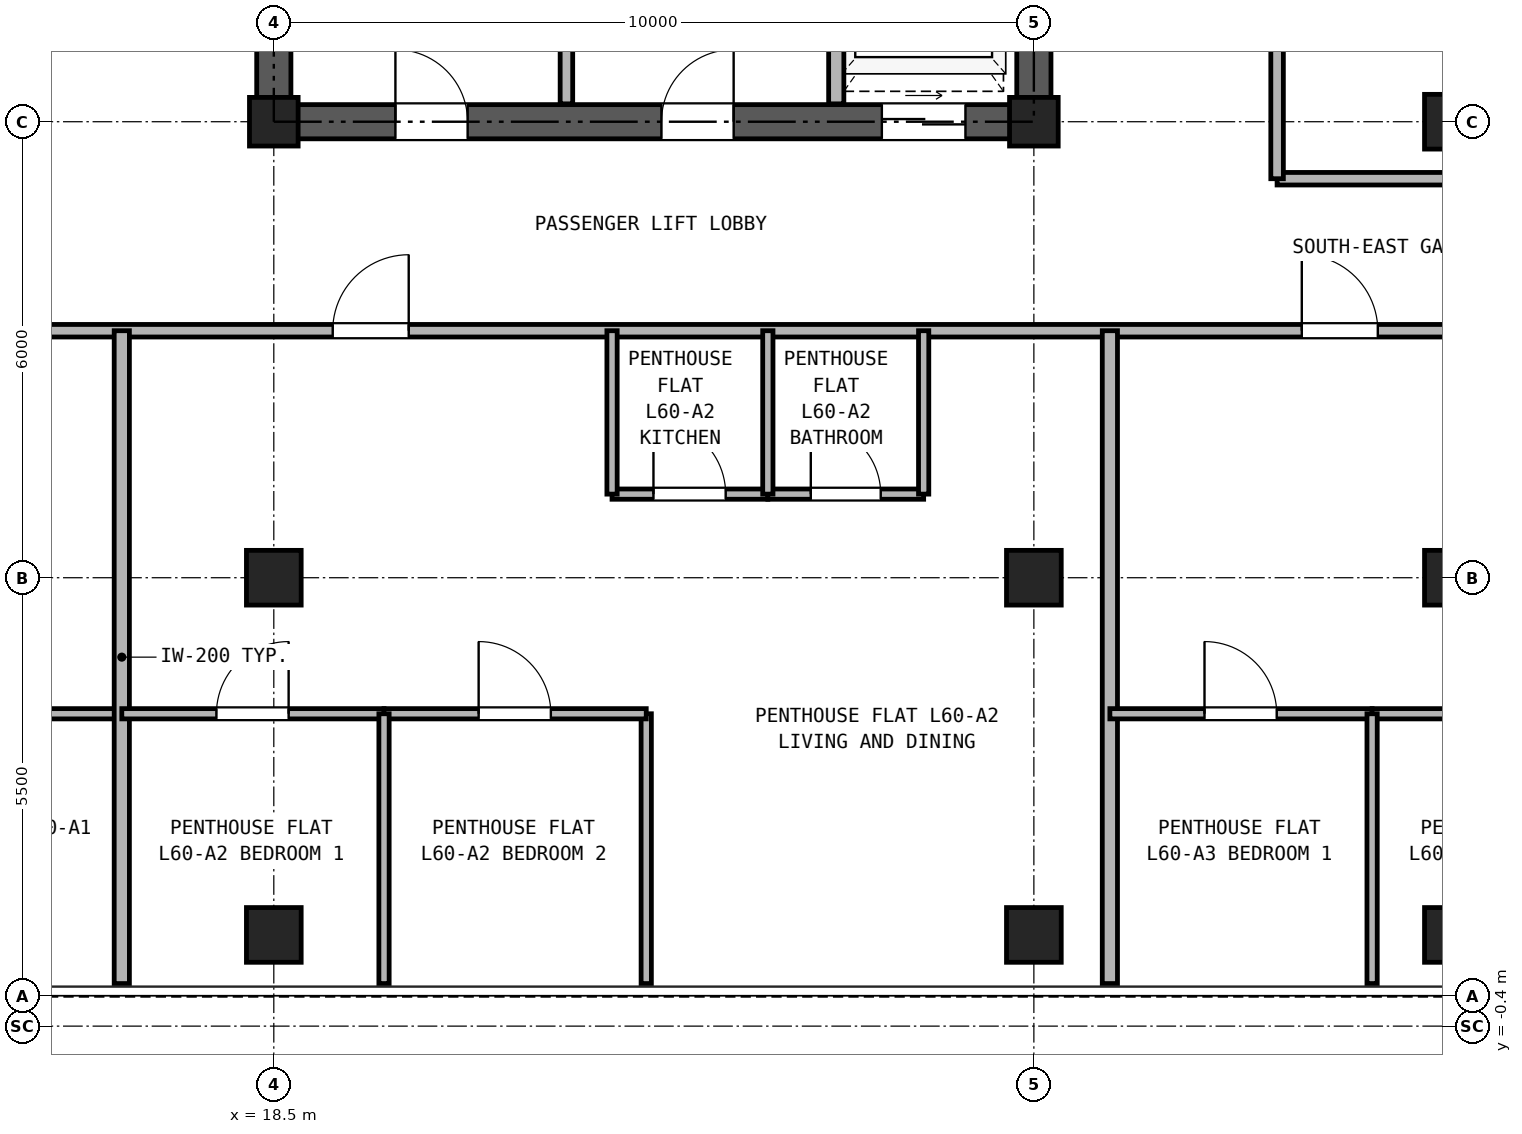
"""IFC4 building model, lengths in metres.
Left out: names, types, materials, properties, quantities, classifications, styles, units other than length and angle.
Written with IfcOpenShell. Run it as: python <this file> out.ifc"""

import sys

from ifc_helpers import new_model, si_unit, direction, frame, frame_2d, origin, origin_2d, place, context, subcontext, project, spatial, rectangle, hollow_rectangle, extrude, source, transform, mapped, element, fill, save


model = new_model("IFC4")
c1 = context("Model", 3, precision=1e-05, world=origin(), true_north=direction((0.0, 1.0)))
c2 = subcontext(c1, "Body", "Model", "MODEL_VIEW")
j1 = project(units=[si_unit("LENGTHUNIT", "METRE"), si_unit("PLANEANGLEUNIT", "RADIAN")], contexts=[c1])
p1 = place(None, origin())
s1 = spatial("IfcSite", under=j1, at=p1, CompositionType="ELEMENT")
p2 = place(p1, origin())
s2 = spatial("IfcBuilding", under=s1, at=p2, CompositionType="ELEMENT")
p3 = place(p2, frame((0.0, 0.0, 212.4)))
s3 = spatial("IfcBuildingStorey", under=s2, at=p3, CompositionType="ELEMENT", Elevation=212.4)
m1 = source(origin(), c2, "Body", "SweptSolid", [
    extrude(hollow_rectangle(XDim=0.72, YDim=0.72, WallThickness=0.04, at=origin_2d()), origin(), (0.0, 0.0, 1.0), 2.84),
])
for number, where, z_axis, x_axis in (
    (1, (18.5, 0.8, 0.0), (0.0, 0.0, 1.0), (1.0, 0.0, 0.0)),
    (2, (28.5, 0.8, 0.0), (0.0, 0.0, 1.0), (1.0, 0.0, 0.0)),
    (3, (34.0, 0.8, 0.0), (0.0, 0.0, 1.0), (1.0, 0.0, 0.0)),
    (4, (18.5, 5.5, 0.0), (0.0, 0.0, 1.0), (1.0, 0.0, 0.0)),
):
    element("IfcColumn", number, at=place(p3, frame(where, z_axis=z_axis, x_axis=x_axis)), inside=s3, PredefinedType="COLUMN", context=c2, shape_type="MappedRepresentation", body=[
        mapped(m1, transform((0.0, 0.0, 0.0), x_axis=(1.0, 0.0, 0.0), y_axis=(0.0, 1.0, 0.0), z_axis=(0.0, 0.0, 1.0), scale=1.0)),
    ])
m2 = source(origin(), c2, "Body", "SweptSolid", [
    extrude(hollow_rectangle(XDim=0.64, YDim=0.64, WallThickness=0.035, at=origin_2d()), origin(), (0.0, 0.0, 1.0), 2.84),
])
p4 = place(p3, frame((18.5, 11.5, 0.0), z_axis=(0.0, 0.0, 1.0), x_axis=(1.0, 0.0, 0.0)))
e5 = element("IfcColumn", 5, at=p4, inside=s3, PredefinedType="COLUMN", context=c2, shape_type="MappedRepresentation", body=[
    mapped(m2, transform((0.0, 0.0, 0.0), x_axis=(1.0, 0.0, 0.0), y_axis=(0.0, 1.0, 0.0), z_axis=(0.0, 0.0, 1.0), scale=1.0)),
])
p5 = place(p3, frame((28.5, 5.5, 0.0), z_axis=(0.0, 0.0, 1.0), x_axis=(1.0, 0.0, 0.0)))
e6 = element("IfcColumn", 6, at=p5, inside=s3, PredefinedType="COLUMN", context=c2, shape_type="MappedRepresentation", body=[
    mapped(m1, transform((0.0, 0.0, 0.0), x_axis=(1.0, 0.0, 0.0), y_axis=(0.0, 1.0, 0.0), z_axis=(0.0, 0.0, 1.0), scale=1.0)),
])
p6 = place(p3, frame((28.5, 11.5, 0.0), z_axis=(0.0, 0.0, 1.0), x_axis=(1.0, 0.0, 0.0)))
e7 = element("IfcColumn", 7, at=p6, inside=s3, PredefinedType="COLUMN", context=c2, shape_type="MappedRepresentation", body=[
    mapped(m2, transform((0.0, 0.0, 0.0), x_axis=(1.0, 0.0, 0.0), y_axis=(0.0, 1.0, 0.0), z_axis=(0.0, 0.0, 1.0), scale=1.0)),
])
for number, where, z_axis, x_axis in (
    (8, (34.0, 5.5, 0.0), (0.0, 0.0, 1.0), (1.0, 0.0, 0.0)),
    (9, (34.0, 11.5, 0.0), (0.0, 0.0, 1.0), (1.0, 0.0, 0.0)),
):
    element("IfcColumn", number, at=place(p3, frame(where, z_axis=z_axis, x_axis=x_axis)), inside=s3, PredefinedType="COLUMN", context=c2, shape_type="MappedRepresentation", body=[
        mapped(m1, transform((0.0, 0.0, 0.0), x_axis=(1.0, 0.0, 0.0), y_axis=(0.0, 1.0, 0.0), z_axis=(0.0, 0.0, 1.0), scale=1.0)),
    ])
p7 = place(p3, frame((18.275, 11.5, 0.0), z_axis=(0.0, 0.0, 1.0), x_axis=(1.0, 0.0, 0.0)))
e10 = element("IfcWall", 10, at=p7, inside=s3, PredefinedType="SHEAR", context=c2, shape_type="SweptSolid", body=[
    extrude(rectangle(XDim=10.45, YDim=0.45, at=frame_2d((5.225, 0.0))), origin(), (0.0, 0.0, 1.0), 2.84),
])
p8 = place(p7, frame((1.825, 0.0, 0.0)))
e11 = element("IfcOpeningElement", 11, at=p8, cuts=e10, PredefinedType="OPENING", context=c2, shape_type="SweptSolid", body=[
    extrude(rectangle(XDim=0.95, YDim=2.15, at=frame_2d((0.475, 1.075))), frame((0.0, 0.235, 0.0), z_axis=(0.0, -1.0, 0.0), x_axis=(1.0, 0.0, 0.0)), (0.0, 0.0, 1.0), 0.47),
])
p9 = place(p7, frame((5.325, 0.0, 0.0)))
e12 = element("IfcOpeningElement", 12, at=p9, cuts=e10, PredefinedType="OPENING", context=c2, shape_type="SweptSolid", body=[
    extrude(rectangle(XDim=0.95, YDim=2.15, at=frame_2d((0.475, 1.075))), frame((0.0, 0.235, 0.0), z_axis=(0.0, -1.0, 0.0), x_axis=(1.0, 0.0, 0.0)), (0.0, 0.0, 1.0), 0.47),
])
p10 = place(p7, frame((8.225, 0.0, 0.0)))
e13 = element("IfcOpeningElement", 13, at=p10, cuts=e10, PredefinedType="OPENING", context=c2, shape_type="SweptSolid", body=[
    extrude(rectangle(XDim=1.1, YDim=2.25, at=frame_2d((0.55, 1.125))), frame((0.0, 0.235, 0.0), z_axis=(0.0, -1.0, 0.0), x_axis=(1.0, 0.0, 0.0)), (0.0, 0.0, 1.0), 0.47),
])
p11 = place(p3, frame((18.5, 11.725, 0.0), z_axis=(0.0, 0.0, 1.0), x_axis=(0.0, 1.0, 0.0)))
e14 = element("IfcWall", 14, at=p11, inside=s3, PredefinedType="SHEAR", context=c2, shape_type="SweptSolid", body=[
    extrude(rectangle(XDim=16.8, YDim=0.45, at=frame_2d((8.4, 0.0))), origin(), (0.0, 0.0, 1.0), 2.84),
])
p12 = place(p11, frame((7.425, 0.0, 0.0)))
e15 = element("IfcOpeningElement", 15, at=p12, cuts=e14, PredefinedType="OPENING", context=c2, shape_type="SweptSolid", body=[
    extrude(rectangle(XDim=1.15, YDim=2.2, at=frame_2d((0.575, 1.1))), frame((0.0, 0.235, 0.0), z_axis=(0.0, -1.0, 0.0), x_axis=(1.0, 0.0, 0.0)), (0.0, 0.0, 1.0), 0.47),
])
p13 = place(p3, frame((28.5, 11.725, 0.0), z_axis=(0.0, 0.0, 1.0), x_axis=(0.0, 1.0, 0.0)))
e16 = element("IfcWall", 16, at=p13, inside=s3, PredefinedType="SHEAR", context=c2, shape_type="SweptSolid", body=[
    extrude(rectangle(XDim=16.8, YDim=0.45, at=frame_2d((8.4, 0.0))), origin(), (0.0, 0.0, 1.0), 2.84),
])
p14 = place(p13, frame((7.425, 0.0, 0.0)))
e17 = element("IfcOpeningElement", 17, at=p14, cuts=e16, PredefinedType="OPENING", context=c2, shape_type="SweptSolid", body=[
    extrude(rectangle(XDim=1.15, YDim=2.2, at=frame_2d((0.575, 1.1))), frame((0.0, 0.235, 0.0), z_axis=(0.0, -1.0, 0.0), x_axis=(1.0, 0.0, 0.0)), (0.0, 0.0, 1.0), 0.47),
])
p15 = place(p3, frame((22.35, 11.735, 0.0), z_axis=(0.0, 0.0, 1.0), x_axis=(0.0, 1.0, 0.0)))
e18 = element("IfcWall", 18, at=p15, inside=s3, PredefinedType="PARTITIONING", context=c2, shape_type="SweptSolid", body=[
    extrude(rectangle(XDim=3.265, YDim=0.165, at=frame_2d((1.632, 0.0))), origin(), (0.0, 0.0, 1.0), 2.84),
])
p16 = place(p3, frame((25.9, 11.735, 0.0), z_axis=(0.0, 0.0, 1.0), x_axis=(0.0, 1.0, 0.0)))
e19 = element("IfcWall", 19, at=p16, inside=s3, PredefinedType="PARTITIONING", context=c2, shape_type="SweptSolid", body=[
    extrude(rectangle(XDim=3.265, YDim=0.2, at=frame_2d((1.632, 0.0))), origin(), (0.0, 0.0, 1.0), 2.84),
])
p17 = place(p3, frame((0.16, 8.75, 0.0), z_axis=(0.0, 0.0, 1.0), x_axis=(1.0, 0.0, 0.0)))
e20 = element("IfcWall", 20, at=p17, inside=s3, PredefinedType="PARTITIONING", context=c2, shape_type="SweptSolid", body=[
    extrude(rectangle(XDim=41.48, YDim=0.165, at=frame_2d((20.74, 0.0))), origin(), (0.0, 0.0, 1.0), 2.84),
])
p18 = place(p17, frame((13.315, 0.0, 0.0)))
e21 = element("IfcOpeningElement", 21, at=p18, cuts=e20, PredefinedType="OPENING", context=c2, shape_type="SweptSolid", body=[
    extrude(rectangle(XDim=1.0, YDim=2.15, at=frame_2d((0.5, 1.075))), frame((0.0, 0.093, 0.0), z_axis=(0.0, -1.0, 0.0), x_axis=(1.0, 0.0, 0.0)), (0.0, 0.0, 1.0), 0.185),
])
p19 = place(p17, frame((19.115, 0.0, 0.0)))
e22 = element("IfcOpeningElement", 22, at=p19, cuts=e20, PredefinedType="OPENING", context=c2, shape_type="SweptSolid", body=[
    extrude(rectangle(XDim=1.0, YDim=2.15, at=frame_2d((0.5, 1.075))), frame((0.0, 0.093, 0.0), z_axis=(0.0, -1.0, 0.0), x_axis=(1.0, 0.0, 0.0)), (0.0, 0.0, 1.0), 0.185),
])
p20 = place(p17, frame((31.865, 0.0, 0.0)))
e23 = element("IfcOpeningElement", 23, at=p20, cuts=e20, PredefinedType="OPENING", context=c2, shape_type="SweptSolid", body=[
    extrude(rectangle(XDim=1.0, YDim=2.15, at=frame_2d((0.5, 1.075))), frame((0.0, 0.093, 0.0), z_axis=(0.0, -1.0, 0.0), x_axis=(1.0, 0.0, 0.0)), (0.0, 0.0, 1.0), 0.185),
])
p21 = place(p3, frame((31.7, 10.75, 0.0), z_axis=(0.0, 0.0, 1.0), x_axis=(1.0, 0.0, 0.0)))
e24 = element("IfcWall", 24, at=p21, inside=s3, PredefinedType="PARTITIONING", context=c2, shape_type="SweptSolid", body=[
    extrude(rectangle(XDim=6.5, YDim=0.165, at=frame_2d((3.25, 0.0))), origin(), (0.0, 0.0, 1.0), 2.84),
])
p22 = place(p3, frame((31.7, 10.75, 0.0), z_axis=(0.0, 0.0, 1.0), x_axis=(0.0, 1.0, 0.0)))
e25 = element("IfcWall", 25, at=p22, inside=s3, PredefinedType="PARTITIONING", context=c2, shape_type="SweptSolid", body=[
    extrude(rectangle(XDim=24.39, YDim=0.165, at=frame_2d((12.195, 0.0))), origin(), (0.0, 0.0, 1.0), 2.84),
])
p23 = place(p22, frame((9.875, 0.0, 0.0)))
e26 = element("IfcOpeningElement", 26, at=p23, cuts=e25, PredefinedType="OPENING", context=c2, shape_type="SweptSolid", body=[
    extrude(rectangle(XDim=1.0, YDim=2.15, at=frame_2d((0.5, 1.075))), frame((0.0, 0.093, 0.0), z_axis=(0.0, -1.0, 0.0), x_axis=(1.0, 0.0, 0.0)), (0.0, 0.0, 1.0), 0.185),
])
p24 = place(p3, frame((12.579, 3.71, 0.0), z_axis=(0.0, 0.0, 1.0), x_axis=(1.0, 0.0, 0.0)))
e27 = element("IfcWall", 27, at=p24, inside=s3, PredefinedType="PARTITIONING", context=c2, shape_type="SweptSolid", body=[
    extrude(rectangle(XDim=3.921, YDim=0.135, at=frame_2d((1.961, 0.0))), origin(), (0.0, 0.0, 1.0), 2.84),
])
p25 = place(p24, frame((1.48, 0.0, 0.0)))
e28 = element("IfcOpeningElement", 28, at=p25, cuts=e27, PredefinedType="OPENING", context=c2, shape_type="SweptSolid", body=[
    extrude(rectangle(XDim=0.95, YDim=2.15, at=frame_2d((0.475, 1.075))), frame((0.0, 0.077, 0.0), z_axis=(0.0, -1.0, 0.0), x_axis=(1.0, 0.0, 0.0)), (0.0, 0.0, 1.0), 0.155),
])
p26 = place(p3, frame((16.5, 0.16, 0.0), z_axis=(0.0, 0.0, 1.0), x_axis=(0.0, 1.0, 0.0)))
e29 = element("IfcWall", 29, at=p26, inside=s3, PredefinedType="PARTITIONING", context=c2, shape_type="SweptSolid", body=[
    extrude(rectangle(XDim=8.59, YDim=0.2, at=frame_2d((4.295, 0.0))), origin(), (0.0, 0.0, 1.0), 2.84),
])
p27 = place(p3, frame((22.95, 6.6, 0.0), z_axis=(0.0, 0.0, 1.0), x_axis=(1.0, 0.0, 0.0)))
e30 = element("IfcWall", 30, at=p27, inside=s3, PredefinedType="PARTITIONING", context=c2, shape_type="SweptSolid", body=[
    extrude(rectangle(XDim=2.05, YDim=0.135, at=frame_2d((1.025, 0.0))), origin(), (0.0, 0.0, 1.0), 2.84),
])
p28 = place(p27, frame((0.545, 0.0, 0.0)))
e31 = element("IfcOpeningElement", 31, at=p28, cuts=e30, PredefinedType="OPENING", context=c2, shape_type="SweptSolid", body=[
    extrude(rectangle(XDim=0.95, YDim=2.15, at=frame_2d((0.475, 1.075))), frame((0.0, 0.077, 0.0), z_axis=(0.0, -1.0, 0.0), x_axis=(1.0, 0.0, 0.0)), (0.0, 0.0, 1.0), 0.155),
])
p29 = place(p3, frame((25.0, 6.6, 0.0), z_axis=(0.0, 0.0, 1.0), x_axis=(1.0, 0.0, 0.0)))
e32 = element("IfcWall", 32, at=p29, inside=s3, PredefinedType="PARTITIONING", context=c2, shape_type="SweptSolid", body=[
    extrude(rectangle(XDim=2.05, YDim=0.135, at=frame_2d((1.025, 0.0))), origin(), (0.0, 0.0, 1.0), 2.84),
])
p30 = place(p29, frame((0.565, 0.0, 0.0)))
e33 = element("IfcOpeningElement", 33, at=p30, cuts=e32, PredefinedType="OPENING", context=c2, shape_type="SweptSolid", body=[
    extrude(rectangle(XDim=0.92, YDim=2.1, at=frame_2d((0.46, 1.05))), frame((0.0, 0.077, 0.0), z_axis=(0.0, -1.0, 0.0), x_axis=(1.0, 0.0, 0.0)), (0.0, 0.0, 1.0), 0.155),
])
for number, where, z_axis, x_axis in (
    (34, (22.95, 6.6, 0.0), (0.0, 0.0, 1.0), (0.0, 1.0, 0.0)),
    (35, (25.0, 6.6, 0.0), (0.0, 0.0, 1.0), (0.0, 1.0, 0.0)),
    (36, (27.05, 6.6, 0.0), (0.0, 0.0, 1.0), (0.0, 1.0, 0.0)),
):
    element("IfcWall", number, at=place(p3, frame(where, z_axis=z_axis, x_axis=x_axis)), inside=s3, PredefinedType="PARTITIONING", context=c2, shape_type="SweptSolid", body=[
        extrude(rectangle(XDim=2.15, YDim=0.135, at=frame_2d((1.075, 0.0))), origin(), (0.0, 0.0, 1.0), 2.84),
    ])
p31 = place(p3, frame((23.4, 0.16, 0.0), z_axis=(0.0, 0.0, 1.0), x_axis=(0.0, 1.0, 0.0)))
e37 = element("IfcWall", 37, at=p31, inside=s3, PredefinedType="PARTITIONING", context=c2, shape_type="SweptSolid", body=[
    extrude(rectangle(XDim=3.55, YDim=0.135, at=frame_2d((1.775, 0.0))), origin(), (0.0, 0.0, 1.0), 2.84),
])
p32 = place(p3, frame((16.5, 3.71, 0.0), z_axis=(0.0, 0.0, 1.0), x_axis=(1.0, 0.0, 0.0)))
e38 = element("IfcWall", 38, at=p32, inside=s3, PredefinedType="PARTITIONING", context=c2, shape_type="SweptSolid", body=[
    extrude(rectangle(XDim=3.45, YDim=0.135, at=frame_2d((1.725, 0.0))), origin(), (0.0, 0.0, 1.0), 2.84),
])
p33 = place(p32, frame((1.245, 0.0, 0.0)))
e39 = element("IfcOpeningElement", 39, at=p33, cuts=e38, PredefinedType="OPENING", context=c2, shape_type="SweptSolid", body=[
    extrude(rectangle(XDim=0.95, YDim=2.15, at=frame_2d((0.475, 1.075))), frame((0.0, 0.077, 0.0), z_axis=(0.0, -1.0, 0.0), x_axis=(1.0, 0.0, 0.0)), (0.0, 0.0, 1.0), 0.155),
])
p34 = place(p3, frame((19.95, 3.71, 0.0), z_axis=(0.0, 0.0, 1.0), x_axis=(1.0, 0.0, 0.0)))
e40 = element("IfcWall", 40, at=p34, inside=s3, PredefinedType="PARTITIONING", context=c2, shape_type="SweptSolid", body=[
    extrude(rectangle(XDim=3.45, YDim=0.135, at=frame_2d((1.725, 0.0))), origin(), (0.0, 0.0, 1.0), 2.84),
])
p35 = place(p34, frame((1.245, 0.0, 0.0)))
e41 = element("IfcOpeningElement", 41, at=p35, cuts=e40, PredefinedType="OPENING", context=c2, shape_type="SweptSolid", body=[
    extrude(rectangle(XDim=0.95, YDim=2.15, at=frame_2d((0.475, 1.075))), frame((0.0, 0.077, 0.0), z_axis=(0.0, -1.0, 0.0), x_axis=(1.0, 0.0, 0.0)), (0.0, 0.0, 1.0), 0.155),
])
p36 = place(p3, frame((19.95, 0.16, 0.0), z_axis=(0.0, 0.0, 1.0), x_axis=(0.0, 1.0, 0.0)))
e42 = element("IfcWall", 42, at=p36, inside=s3, PredefinedType="PARTITIONING", context=c2, shape_type="SweptSolid", body=[
    extrude(rectangle(XDim=3.55, YDim=0.135, at=frame_2d((1.775, 0.0))), origin(), (0.0, 0.0, 1.0), 2.84),
])
p37 = place(p3, frame((29.5, 0.16, 0.0), z_axis=(0.0, 0.0, 1.0), x_axis=(0.0, 1.0, 0.0)))
e43 = element("IfcWall", 43, at=p37, inside=s3, PredefinedType="PARTITIONING", context=c2, shape_type="SweptSolid", body=[
    extrude(rectangle(XDim=8.59, YDim=0.2, at=frame_2d((4.295, 0.0))), origin(), (0.0, 0.0, 1.0), 2.84),
])
p38 = place(p3, frame((29.5, 3.71, 0.0), z_axis=(0.0, 0.0, 1.0), x_axis=(1.0, 0.0, 0.0)))
e44 = element("IfcWall", 44, at=p38, inside=s3, PredefinedType="PARTITIONING", context=c2, shape_type="SweptSolid", body=[
    extrude(rectangle(XDim=3.45, YDim=0.135, at=frame_2d((1.725, 0.0))), origin(), (0.0, 0.0, 1.0), 2.84),
])
p39 = place(p38, frame((1.245, 0.0, 0.0)))
e45 = element("IfcOpeningElement", 45, at=p39, cuts=e44, PredefinedType="OPENING", context=c2, shape_type="SweptSolid", body=[
    extrude(rectangle(XDim=0.95, YDim=2.15, at=frame_2d((0.475, 1.075))), frame((0.0, 0.077, 0.0), z_axis=(0.0, -1.0, 0.0), x_axis=(1.0, 0.0, 0.0)), (0.0, 0.0, 1.0), 0.155),
])
p40 = place(p3, frame((32.95, 3.71, 0.0), z_axis=(0.0, 0.0, 1.0), x_axis=(1.0, 0.0, 0.0)))
e46 = element("IfcWall", 46, at=p40, inside=s3, PredefinedType="PARTITIONING", context=c2, shape_type="SweptSolid", body=[
    extrude(rectangle(XDim=3.45, YDim=0.135, at=frame_2d((1.725, 0.0))), origin(), (0.0, 0.0, 1.0), 2.84),
])
p41 = place(p40, frame((1.245, 0.0, 0.0)))
e47 = element("IfcOpeningElement", 47, at=p41, cuts=e46, PredefinedType="OPENING", context=c2, shape_type="SweptSolid", body=[
    extrude(rectangle(XDim=0.95, YDim=2.15, at=frame_2d((0.475, 1.075))), frame((0.0, 0.077, 0.0), z_axis=(0.0, -1.0, 0.0), x_axis=(1.0, 0.0, 0.0)), (0.0, 0.0, 1.0), 0.155),
])
p42 = place(p3, frame((32.95, 0.16, 0.0), z_axis=(0.0, 0.0, 1.0), x_axis=(0.0, 1.0, 0.0)))
e48 = element("IfcWall", 48, at=p42, inside=s3, PredefinedType="PARTITIONING", context=c2, shape_type="SweptSolid", body=[
    extrude(rectangle(XDim=3.55, YDim=0.135, at=frame_2d((1.775, 0.0))), origin(), (0.0, 0.0, 1.0), 2.84),
])
p43 = place(p8, frame((0.95, 0.0, 0.0), z_axis=(0.0, 0.0, 1.0), x_axis=(-1.0, 0.0, 0.0)))
e49 = element("IfcDoor", 49, at=p43, inside=s3, OperationType="SINGLE_SWING_LEFT", PredefinedType="DOOR", context=c2, shape_type="SweptSolid", body=[
    extrude(rectangle(XDim=0.95, YDim=2.15, at=frame_2d((0.475, 1.075))), frame((0.0, 0.025, 0.0), z_axis=(0.0, -1.0, 0.0), x_axis=(1.0, 0.0, 0.0)), (0.0, 0.0, 1.0), 0.05),
])
fill(e11, e49)
p44 = place(p9, frame((0.95, 0.0, 0.0), z_axis=(0.0, 0.0, 1.0), x_axis=(-1.0, 0.0, 0.0)))
e50 = element("IfcDoor", 50, at=p44, inside=s3, OperationType="SINGLE_SWING_RIGHT", PredefinedType="DOOR", context=c2, shape_type="SweptSolid", body=[
    extrude(rectangle(XDim=0.95, YDim=2.15, at=frame_2d((0.475, 1.075))), frame((0.0, 0.025, 0.0), z_axis=(0.0, -1.0, 0.0), x_axis=(1.0, 0.0, 0.0)), (0.0, 0.0, 1.0), 0.05),
])
fill(e12, e50)
p45 = place(p10, frame((1.1, 0.0, 0.0), z_axis=(0.0, 0.0, 1.0), x_axis=(-1.0, 0.0, 0.0)))
e51 = element("IfcDoor", 51, at=p45, inside=s3, OperationType="DOUBLE_DOOR_SLIDING", PredefinedType="DOOR", context=c2, shape_type="SweptSolid", body=[
    extrude(rectangle(XDim=1.1, YDim=2.25, at=frame_2d((0.55, 1.125))), frame((0.0, 0.025, 0.0), z_axis=(0.0, -1.0, 0.0), x_axis=(1.0, 0.0, 0.0)), (0.0, 0.0, 1.0), 0.05),
])
fill(e13, e51)
p46 = place(p28, origin())
e52 = element("IfcDoor", 52, at=p46, inside=s3, OperationType="SINGLE_SWING_LEFT", PredefinedType="DOOR", context=c2, shape_type="SweptSolid", body=[
    extrude(rectangle(XDim=0.95, YDim=2.15, at=frame_2d((0.475, 1.075))), frame((0.0, 0.025, 0.0), z_axis=(0.0, -1.0, 0.0), x_axis=(1.0, 0.0, 0.0)), (0.0, 0.0, 1.0), 0.05),
])
fill(e31, e52)
p47 = place(p30, origin())
e53 = element("IfcDoor", 53, at=p47, inside=s3, OperationType="SINGLE_SWING_LEFT", PredefinedType="DOOR", context=c2, shape_type="SweptSolid", body=[
    extrude(rectangle(XDim=0.92, YDim=2.1, at=frame_2d((0.46, 1.05))), frame((0.0, 0.025, 0.0), z_axis=(0.0, -1.0, 0.0), x_axis=(1.0, 0.0, 0.0)), (0.0, 0.0, 1.0), 0.05),
])
fill(e33, e53)
p48 = place(p33, frame((0.95, 0.0, 0.0), z_axis=(0.0, 0.0, 1.0), x_axis=(-1.0, 0.0, 0.0)))
e54 = element("IfcDoor", 54, at=p48, inside=s3, OperationType="SINGLE_SWING_RIGHT", PredefinedType="DOOR", context=c2, shape_type="SweptSolid", body=[
    extrude(rectangle(XDim=0.95, YDim=2.15, at=frame_2d((0.475, 1.075))), frame((0.0, 0.025, 0.0), z_axis=(0.0, -1.0, 0.0), x_axis=(1.0, 0.0, 0.0)), (0.0, 0.0, 1.0), 0.05),
])
fill(e39, e54)
p49 = place(p35, frame((0.95, 0.0, 0.0), z_axis=(0.0, 0.0, 1.0), x_axis=(-1.0, 0.0, 0.0)))
e55 = element("IfcDoor", 55, at=p49, inside=s3, OperationType="SINGLE_SWING_LEFT", PredefinedType="DOOR", context=c2, shape_type="SweptSolid", body=[
    extrude(rectangle(XDim=0.95, YDim=2.15, at=frame_2d((0.475, 1.075))), frame((0.0, 0.025, 0.0), z_axis=(0.0, -1.0, 0.0), x_axis=(1.0, 0.0, 0.0)), (0.0, 0.0, 1.0), 0.05),
])
fill(e41, e55)
p50 = place(p19, frame((1.0, 0.0, 0.0), z_axis=(0.0, 0.0, 1.0), x_axis=(-1.0, 0.0, 0.0)))
e56 = element("IfcDoor", 56, at=p50, inside=s3, OperationType="SINGLE_SWING_RIGHT", PredefinedType="DOOR", context=c2, shape_type="SweptSolid", body=[
    extrude(rectangle(XDim=1.0, YDim=2.15, at=frame_2d((0.5, 1.075))), frame((0.0, 0.025, 0.0), z_axis=(0.0, -1.0, 0.0), x_axis=(1.0, 0.0, 0.0)), (0.0, 0.0, 1.0), 0.05),
])
fill(e22, e56)
p51 = place(p39, frame((0.95, 0.0, 0.0), z_axis=(0.0, 0.0, 1.0), x_axis=(-1.0, 0.0, 0.0)))
e57 = element("IfcDoor", 57, at=p51, inside=s3, OperationType="SINGLE_SWING_LEFT", PredefinedType="DOOR", context=c2, shape_type="SweptSolid", body=[
    extrude(rectangle(XDim=0.95, YDim=2.15, at=frame_2d((0.475, 1.075))), frame((0.0, 0.025, 0.0), z_axis=(0.0, -1.0, 0.0), x_axis=(1.0, 0.0, 0.0)), (0.0, 0.0, 1.0), 0.05),
])
fill(e45, e57)
p52 = place(p20, frame((1.0, 0.0, 0.0), z_axis=(0.0, 0.0, 1.0), x_axis=(-1.0, 0.0, 0.0)))
e58 = element("IfcDoor", 58, at=p52, inside=s3, OperationType="SINGLE_SWING_LEFT", PredefinedType="DOOR", context=c2, shape_type="SweptSolid", body=[
    extrude(rectangle(XDim=1.0, YDim=2.15, at=frame_2d((0.5, 1.075))), frame((0.0, 0.025, 0.0), z_axis=(0.0, -1.0, 0.0), x_axis=(1.0, 0.0, 0.0)), (0.0, 0.0, 1.0), 0.05),
])
fill(e23, e58)
save(model, sys.argv[1])
